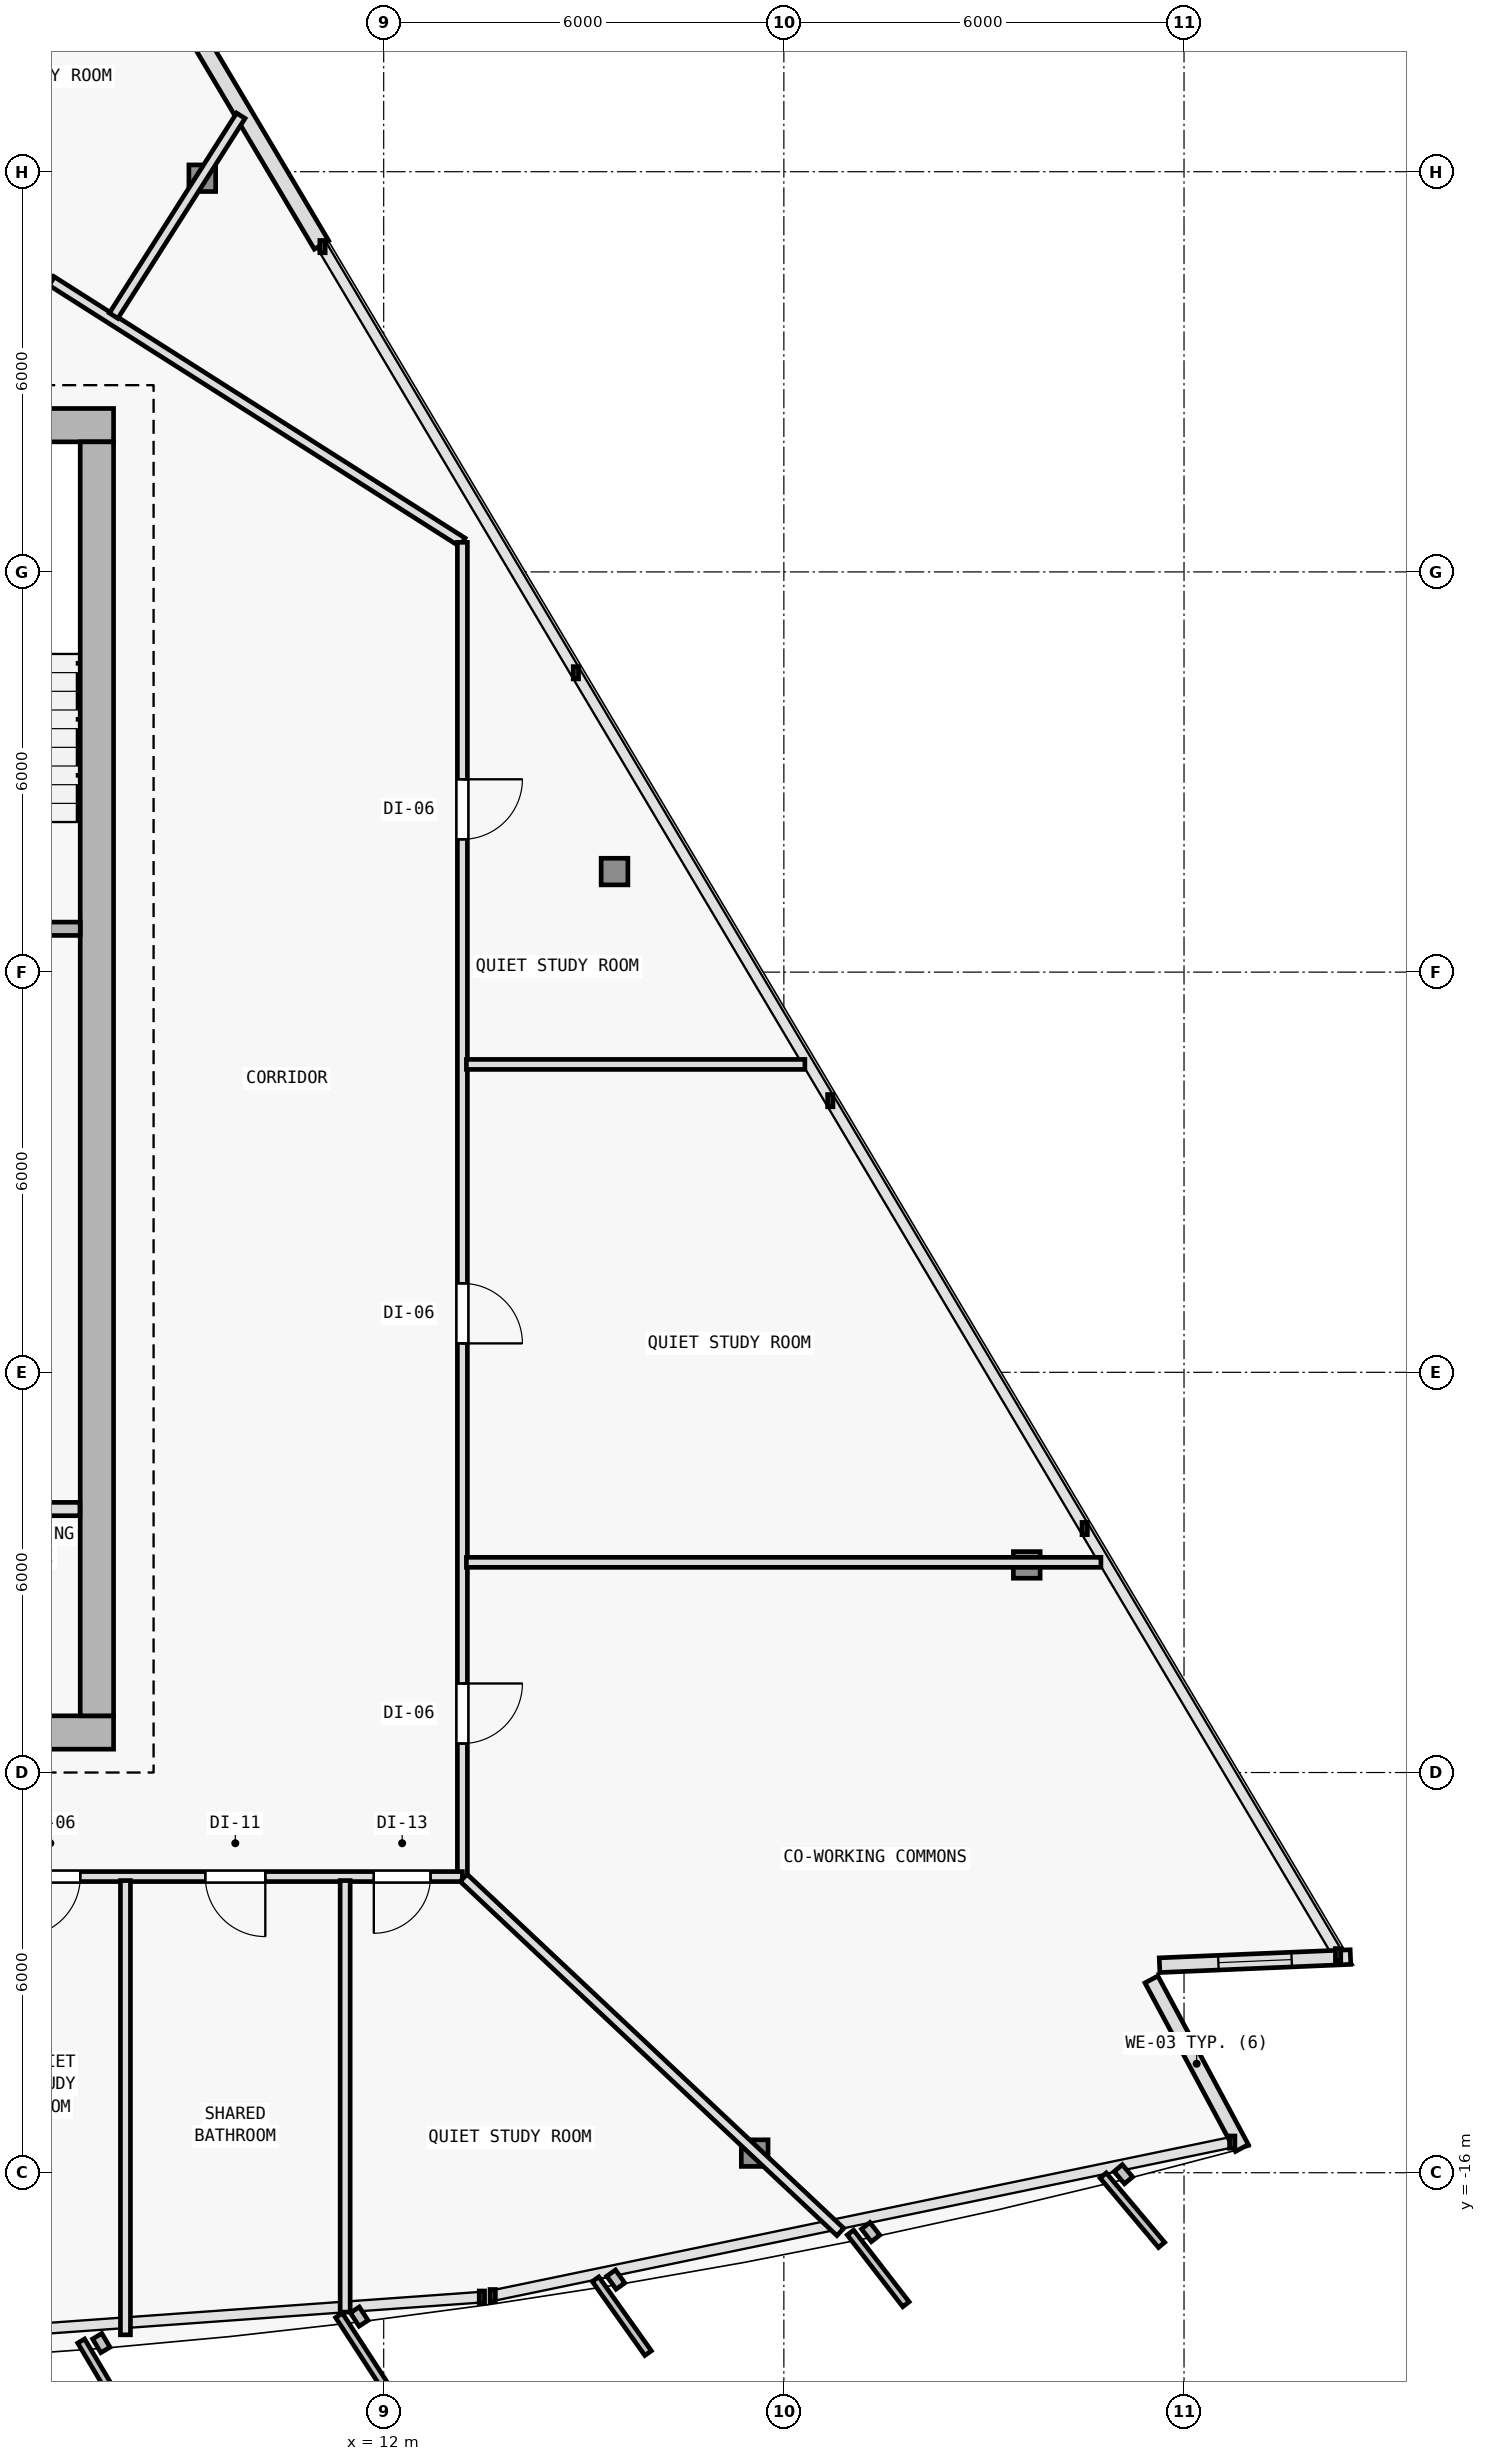
"""IFC4 building model, lengths in metres.
Left out: names, types, materials, properties, quantities, classifications, styles, units other than length and angle.
Written with IfcOpenShell. Run it as: python <this file> out.ifc"""

import sys

from ifc_helpers import new_model, si_unit, direction, frame, frame_2d, origin, origin_2d, place, context, subcontext, project, spatial, rectangle, i_section, extrude, element, fill, save


model = new_model("IFC4")
c1 = context("Model", 3, precision=1e-05, world=origin(), true_north=direction((0.0, 1.0)))
c2 = subcontext(c1, "Body", "Model", "MODEL_VIEW")
j1 = project(units=[si_unit("LENGTHUNIT", "METRE"), si_unit("PLANEANGLEUNIT", "RADIAN")], contexts=[c1])
p1 = place(None, origin())
s1 = spatial("IfcSite", under=j1, at=p1, CompositionType="ELEMENT")
p2 = place(p1, origin())
s2 = spatial("IfcBuilding", under=s1, at=p2, CompositionType="ELEMENT")
p3 = place(p2, frame((0.0, 0.0, 167.4)))
s3 = spatial("IfcBuildingStorey", under=s2, at=p3, CompositionType="ELEMENT", Elevation=167.4)
for number, where, z_axis, x_axis in (
    (1, (7.7, -9.4, 0.0), (0.0, 0.0, 1.0), (1.0, 0.0, 0.0)),
    (2, (7.7, 10.2, 0.0), (0.0, 0.0, 1.0), (1.0, 0.0, 0.0)),
    (3, (7.7, 0.4, 0.0), (0.0, 0.0, 1.0), (1.0, 0.0, 0.0)),
):
    element("IfcColumn", number, at=place(p3, frame(where, z_axis=z_axis, x_axis=x_axis)), inside=s3, PredefinedType="COLUMN", context=c2, shape_type="SweptSolid", body=[
        extrude(i_section(OverallWidth=0.404, OverallDepth=0.407, WebThickness=0.017, FlangeThickness=0.028, FilletRadius=0.015, at=origin_2d()), origin(), (0.0, 0.0, 1.0), 3.6),
    ])
p4 = place(p3, frame((17.562, -15.706, 0.006), z_axis=(-0.020596292833, 0.033511459955, 0.999226087917), x_axis=(-0.851954850327, -0.523615252838, 0.0)))
e4 = element("IfcColumn", 4, at=p4, inside=s3, PredefinedType="COLUMN", context=c2, shape_type="SweptSolid", body=[
    extrude(i_section(OverallWidth=0.401, OverallDepth=0.399, WebThickness=0.016, FlangeThickness=0.025, FilletRadius=0.015, at=origin_2d()), origin(), (0.0, 0.0, 1.0), 3.592),
])
p5 = place(p3, frame((21.642, -6.887, 0.006), z_axis=(-0.026107436898, 0.021620221181, 0.999425318758), x_axis=(-0.637813971185, -0.770190455771, 0.0)))
e5 = element("IfcColumn", 5, at=p5, inside=s3, PredefinedType="COLUMN", context=c2, shape_type="SweptSolid", body=[
    extrude(i_section(OverallWidth=0.401, OverallDepth=0.399, WebThickness=0.016, FlangeThickness=0.025, FilletRadius=0.015, at=origin_2d()), origin(), (0.0, 0.0, 1.0), 3.591),
])
p6 = place(p3, frame((15.461, 3.508, 0.006), z_axis=(-0.018907326549, 0.00952167524, 0.999775900241), x_axis=(-0.449781931574, -0.893138406984, 0.0)))
e6 = element("IfcColumn", 6, at=p6, inside=s3, PredefinedType="COLUMN", context=c2, shape_type="SweptSolid", body=[
    extrude(i_section(OverallWidth=0.401, OverallDepth=0.399, WebThickness=0.016, FlangeThickness=0.025, FilletRadius=0.015, at=origin_2d()), origin(), (0.0, 0.0, 1.0), 3.59),
])
p7 = place(p3, frame((9.28, 13.903, 0.006), z_axis=(-0.011699840322, -0.002584848443, 0.999928213571), x_axis=(0.215728093413, -0.976453475447, 0.0)))
e7 = element("IfcColumn", 7, at=p7, inside=s3, PredefinedType="COLUMN", context=c2, shape_type="SweptSolid", body=[
    extrude(i_section(OverallWidth=0.401, OverallDepth=0.399, WebThickness=0.016, FlangeThickness=0.025, FilletRadius=0.015, at=origin_2d()), origin(), (0.0, 0.0, 1.0), 3.589),
])
p8 = place(p3, frame((5.706, 21.919, 0.0), z_axis=(0.0, 0.0, 1.0), x_axis=(0.511079110892, -0.859533677298, 0.0)))
e8 = element("IfcWall", 8, at=p8, inside=s3, PredefinedType="SOLIDWALL", context=c2, shape_type="SweptSolid", body=[
    extrude(rectangle(XDim=10.489, YDim=0.25, at=frame_2d((5.245, 0.0))), origin(), (0.0, 0.0, 1.0), 3.35),
])
p9 = place(p8, frame((4.645, 0.0, 0.62)))
e9 = element("IfcOpeningElement", 9, at=p9, cuts=e8, PredefinedType="OPENING", context=c2, shape_type="SweptSolid", body=[
    extrude(rectangle(XDim=1.2, YDim=1.8, at=frame_2d((0.6, 0.9))), frame((0.0, 0.135, 0.0), z_axis=(0.0, -1.0, 0.0), x_axis=(1.0, 0.0, 0.0)), (0.0, 0.0, 1.0), 0.27),
])
p10 = place(p3, frame((23.511, -13.102, 0.0), z_axis=(0.0, 0.0, 1.0), x_axis=(0.472804807667, -0.881167188362, 0.0)))
e10 = element("IfcWall", 10, at=p10, inside=s3, PredefinedType="SOLIDWALL", context=c2, shape_type="SweptSolid", body=[
    extrude(rectangle(XDim=2.868, YDim=0.22, at=frame_2d((1.434, 0.0))), origin(), (0.0, 0.0, 1.0), 3.35),
])
p11 = place(p3, frame((26.496, -12.767, 0.0), z_axis=(0.0, 0.0, 1.0), x_axis=(-0.999095763679, -0.042516526188, 0.0)))
e11 = element("IfcWall", 11, at=p11, inside=s3, PredefinedType="SOLIDWALL", context=c2, shape_type="SweptSolid", body=[
    extrude(rectangle(XDim=2.865, YDim=0.22, at=frame_2d((1.433, 0.0))), origin(), (0.0, 0.0, 1.0), 3.35),
])
p12 = place(p11, frame((0.883, 0.0, 0.62)))
e12 = element("IfcOpeningElement", 12, at=p12, cuts=e11, PredefinedType="OPENING", context=c2, shape_type="SweptSolid", body=[
    extrude(rectangle(XDim=1.1, YDim=1.8, at=frame_2d((0.55, 0.9))), frame((0.0, 0.12, 0.0), z_axis=(0.0, -1.0, 0.0), x_axis=(1.0, 0.0, 0.0)), (0.0, 0.0, 1.0), 0.24),
])
p13 = place(p3, frame((-7.95, -9.4, 0.0), z_axis=(0.0, 0.0, 1.0), x_axis=(1.0, 0.0, 0.0)))
e13 = element("IfcWall", 13, at=p13, inside=s3, PredefinedType="SHEAR", context=c2, shape_type="SweptSolid", body=[
    extrude(rectangle(XDim=15.9, YDim=0.5, at=frame_2d((7.95, 0.0))), origin(), (0.0, 0.0, 1.0), 3.35),
])
p14 = place(p13, frame((9.6, 0.0, 0.0)))
e14 = element("IfcOpeningElement", 14, at=p14, cuts=e13, PredefinedType="OPENING", context=c2, shape_type="SweptSolid", body=[
    extrude(rectangle(XDim=1.5, YDim=2.2, at=frame_2d((0.75, 1.1))), frame((0.0, 0.26, 0.0), z_axis=(0.0, -1.0, 0.0), x_axis=(1.0, 0.0, 0.0)), (0.0, 0.0, 1.0), 0.52),
])
p15 = place(p3, frame((7.95, 10.2, 0.0), z_axis=(0.0, 0.0, 1.0), x_axis=(-1.0, 0.0, 0.0)))
e15 = element("IfcWall", 15, at=p15, inside=s3, PredefinedType="SHEAR", context=c2, shape_type="SweptSolid", body=[
    extrude(rectangle(XDim=15.9, YDim=0.5, at=frame_2d((7.95, 0.0))), origin(), (0.0, 0.0, 1.0), 3.35),
])
p16 = place(p15, frame((4.4, 0.0, 0.0)))
e16 = element("IfcOpeningElement", 16, at=p16, cuts=e15, PredefinedType="OPENING", context=c2, shape_type="SweptSolid", body=[
    extrude(rectangle(XDim=1.1, YDim=2.15, at=frame_2d((0.55, 1.075))), frame((0.0, 0.26, 0.0), z_axis=(0.0, -1.0, 0.0), x_axis=(1.0, 0.0, 0.0)), (0.0, 0.0, 1.0), 0.52),
])
p17 = place(p3, frame((7.7, 9.95, 0.0), z_axis=(0.0, 0.0, 1.0), x_axis=(0.0, -1.0, 0.0)))
e17 = element("IfcWall", 17, at=p17, inside=s3, PredefinedType="SHEAR", context=c2, shape_type="SweptSolid", body=[
    extrude(rectangle(XDim=19.1, YDim=0.5, at=frame_2d((9.55, 0.0))), origin(), (0.0, 0.0, 1.0), 3.35),
])
p18 = place(p3, frame((4.05, 2.65, 0.0), z_axis=(0.0, 0.0, 1.0), x_axis=(1.0, 0.0, 0.0)))
e18 = element("IfcWall", 18, at=p18, inside=s3, PredefinedType="SOLIDWALL", context=c2, shape_type="SweptSolid", body=[
    extrude(rectangle(XDim=3.4, YDim=0.2, at=frame_2d((1.7, 0.0))), origin(), (0.0, 0.0, 1.0), 3.35),
])
p19 = place(p3, frame((4.15, -6.05, 0.0), z_axis=(0.0, 0.0, 1.0), x_axis=(1.0, 0.0, 0.0)))
e19 = element("IfcWall", 19, at=p19, inside=s3, PredefinedType="SOLIDWALL", context=c2, shape_type="SweptSolid", body=[
    extrude(rectangle(XDim=3.295, YDim=0.2, at=frame_2d((1.647, 0.0))), origin(), (0.0, 0.0, 1.0), 3.35),
])
p20 = place(p3, frame((7.023, 12.36, 0.0), z_axis=(0.0, 0.0, 1.0), x_axis=(0.84376480085, -0.536713108511, 0.0)))
e20 = element("IfcWall", 20, at=p20, inside=s3, PredefinedType="PARTITIONING", context=c2, shape_type="SweptSolid", body=[
    extrude(rectangle(XDim=7.297, YDim=0.15, at=frame_2d((3.648, 0.0))), origin(), (0.0, 0.0, 1.0), 2.935),
])
p21 = place(p3, frame((13.18, 8.444, 0.0), z_axis=(0.0, 0.0, 1.0), x_axis=(0.0, -1.0, 0.0)))
e21 = element("IfcWall", 21, at=p21, inside=s3, PredefinedType="PARTITIONING", context=c2, shape_type="SweptSolid", body=[
    extrude(rectangle(XDim=20.004, YDim=0.15, at=frame_2d((10.002, 0.0))), origin(), (0.0, 0.0, 1.0), 2.825),
])
p22 = place(p21, frame((17.109, 0.0, 0.0)))
e22 = element("IfcOpeningElement", 22, at=p22, cuts=e21, PredefinedType="OPENING", context=c2, shape_type="SweptSolid", body=[
    extrude(rectangle(XDim=0.9, YDim=2.1, at=frame_2d((0.45, 1.05))), frame((0.0, 0.085, 0.0), z_axis=(0.0, -1.0, 0.0), x_axis=(1.0, 0.0, 0.0)), (0.0, 0.0, 1.0), 0.17),
])
p23 = place(p21, frame((11.11, 0.0, 0.0)))
e23 = element("IfcOpeningElement", 23, at=p23, cuts=e21, PredefinedType="OPENING", context=c2, shape_type="SweptSolid", body=[
    extrude(rectangle(XDim=0.9, YDim=2.1, at=frame_2d((0.45, 1.05))), frame((0.0, 0.085, 0.0), z_axis=(0.0, -1.0, 0.0), x_axis=(1.0, 0.0, 0.0)), (0.0, 0.0, 1.0), 0.17),
])
p24 = place(p21, frame((3.553, 0.0, 0.0)))
e24 = element("IfcOpeningElement", 24, at=p24, cuts=e21, PredefinedType="OPENING", context=c2, shape_type="SweptSolid", body=[
    extrude(rectangle(XDim=0.9, YDim=2.1, at=frame_2d((0.45, 1.05))), frame((0.0, 0.085, 0.0), z_axis=(0.0, -1.0, 0.0), x_axis=(1.0, 0.0, 0.0)), (0.0, 0.0, 1.0), 0.17),
])
p25 = place(p3, frame((13.18, -11.56, 0.0), z_axis=(0.0, 0.0, 1.0), x_axis=(-1.0, 0.0, 0.0)))
e25 = element("IfcWall", 25, at=p25, inside=s3, PredefinedType="PARTITIONING", context=c2, shape_type="SweptSolid", body=[
    extrude(rectangle(XDim=23.04, YDim=0.15, at=frame_2d((11.52, 0.0))), origin(), (0.0, 0.0, 1.0), 2.775),
])
p26 = place(p25, frame((20.508, 0.0, 0.0)))
e26 = element("IfcOpeningElement", 26, at=p26, cuts=e25, PredefinedType="OPENING", context=c2, shape_type="SweptSolid", body=[
    extrude(rectangle(XDim=0.9, YDim=2.1, at=frame_2d((0.45, 1.05))), frame((0.0, 0.085, 0.0), z_axis=(0.0, -1.0, 0.0), x_axis=(1.0, 0.0, 0.0)), (0.0, 0.0, 1.0), 0.17),
])
p27 = place(p25, frame((17.525, 0.0, 0.0)))
e27 = element("IfcOpeningElement", 27, at=p27, cuts=e25, PredefinedType="OPENING", context=c2, shape_type="SweptSolid", body=[
    extrude(rectangle(XDim=0.9, YDim=2.1, at=frame_2d((0.45, 1.05))), frame((0.0, 0.085, 0.0), z_axis=(0.0, -1.0, 0.0), x_axis=(1.0, 0.0, 0.0)), (0.0, 0.0, 1.0), 0.17),
])
p28 = place(p25, frame((14.848, 0.0, 0.0)))
e28 = element("IfcOpeningElement", 28, at=p28, cuts=e25, PredefinedType="OPENING", context=c2, shape_type="SweptSolid", body=[
    extrude(rectangle(XDim=0.9, YDim=2.1, at=frame_2d((0.45, 1.05))), frame((0.0, 0.085, 0.0), z_axis=(0.0, -1.0, 0.0), x_axis=(1.0, 0.0, 0.0)), (0.0, 0.0, 1.0), 0.17),
])
p29 = place(p25, frame((11.422, 0.0, 0.0)))
e29 = element("IfcOpeningElement", 29, at=p29, cuts=e25, PredefinedType="OPENING", context=c2, shape_type="SweptSolid", body=[
    extrude(rectangle(XDim=0.9, YDim=2.1, at=frame_2d((0.45, 1.05))), frame((0.0, 0.085, 0.0), z_axis=(0.0, -1.0, 0.0), x_axis=(1.0, 0.0, 0.0)), (0.0, 0.0, 1.0), 0.17),
])
p30 = place(p25, frame((8.225, 0.0, 0.0)))
e30 = element("IfcOpeningElement", 30, at=p30, cuts=e25, PredefinedType="OPENING", context=c2, shape_type="SweptSolid", body=[
    extrude(rectangle(XDim=0.9, YDim=2.1, at=frame_2d((0.45, 1.05))), frame((0.0, 0.085, 0.0), z_axis=(0.0, -1.0, 0.0), x_axis=(1.0, 0.0, 0.0)), (0.0, 0.0, 1.0), 0.17),
])
p31 = place(p25, frame((5.729, 0.0, 0.0)))
e31 = element("IfcOpeningElement", 31, at=p31, cuts=e25, PredefinedType="OPENING", context=c2, shape_type="SweptSolid", body=[
    extrude(rectangle(XDim=0.9, YDim=2.1, at=frame_2d((0.45, 1.05))), frame((0.0, 0.085, 0.0), z_axis=(0.0, -1.0, 0.0), x_axis=(1.0, 0.0, 0.0)), (0.0, 0.0, 1.0), 0.17),
])
p32 = place(p25, frame((2.955, 0.0, 0.0)))
e32 = element("IfcOpeningElement", 32, at=p32, cuts=e25, PredefinedType="OPENING", context=c2, shape_type="SweptSolid", body=[
    extrude(rectangle(XDim=0.9, YDim=2.1, at=frame_2d((0.45, 1.05))), frame((0.0, 0.085, 0.0), z_axis=(0.0, -1.0, 0.0), x_axis=(1.0, 0.0, 0.0)), (0.0, 0.0, 1.0), 0.17),
])
p33 = place(p25, frame((0.478, 0.0, 0.0)))
e33 = element("IfcOpeningElement", 33, at=p33, cuts=e25, PredefinedType="OPENING", context=c2, shape_type="SweptSolid", body=[
    extrude(rectangle(XDim=0.85, YDim=2.1, at=frame_2d((0.425, 1.05))), frame((0.0, 0.085, 0.0), z_axis=(0.0, -1.0, 0.0), x_axis=(1.0, 0.0, 0.0)), (0.0, 0.0, 1.0), 0.17),
])
p34 = place(p3, frame((13.199, -11.579, 0.0), z_axis=(0.0, 0.0, 1.0), x_axis=(0.728641814506, -0.684894959942, 0.0)))
e34 = element("IfcWall", 34, at=p34, inside=s3, PredefinedType="PARTITIONING", context=c2, shape_type="SweptSolid", body=[
    extrude(rectangle(XDim=7.752, YDim=0.15, at=frame_2d((3.876, 0.0))), origin(), (0.0, 0.0, 1.0), 2.775),
])
p35 = place(p3, frame((13.24, -6.849, 0.0), z_axis=(0.0, 0.0, 1.0), x_axis=(1.0, 0.0, 0.0)))
e35 = element("IfcWall", 35, at=p35, inside=s3, PredefinedType="PARTITIONING", context=c2, shape_type="SweptSolid", body=[
    extrude(rectangle(XDim=9.514, YDim=0.15, at=frame_2d((4.757, 0.0))), origin(), (0.0, 0.0, 1.0), 2.825),
])
p36 = place(p3, frame((7.951, 11.841, 0.0), z_axis=(0.0, 0.0, 1.0), x_axis=(0.536702086474, 0.843771811792, 0.0)))
e36 = element("IfcWall", 36, at=p36, inside=s3, PredefinedType="PARTITIONING", context=c2, shape_type="SweptSolid", body=[
    extrude(rectangle(XDim=3.553, YDim=0.15, at=frame_2d((1.777, 0.0))), origin(), (0.0, 0.0, 1.0), 2.935),
])
p37 = place(p3, frame((11.422, -11.62, 0.0), z_axis=(0.0, 0.0, 1.0), x_axis=(0.0, -1.0, 0.0)))
e37 = element("IfcWall", 37, at=p37, inside=s3, PredefinedType="PARTITIONING", context=c2, shape_type="SweptSolid", body=[
    extrude(rectangle(XDim=6.47, YDim=0.15, at=frame_2d((3.235, 0.0))), origin(), (0.0, 0.0, 1.0), 2.825),
])
p38 = place(p3, frame((8.128, -11.62, 0.0), z_axis=(0.0, 0.0, 1.0), x_axis=(0.0, -1.0, 0.0)))
e38 = element("IfcWall", 38, at=p38, inside=s3, PredefinedType="PARTITIONING", context=c2, shape_type="SweptSolid", body=[
    extrude(rectangle(XDim=6.81, YDim=0.15, at=frame_2d((3.405, 0.0))), origin(), (0.0, 0.0, 1.0), 2.875),
])
p39 = place(p3, frame((13.24, 0.616, 0.0), z_axis=(0.0, 0.0, 1.0), x_axis=(1.0, 0.0, 0.0)))
e39 = element("IfcWall", 39, at=p39, inside=s3, PredefinedType="PARTITIONING", context=c2, shape_type="SweptSolid", body=[
    extrude(rectangle(XDim=5.075, YDim=0.15, at=frame_2d((2.538, 0.0))), origin(), (0.0, 0.0, 1.0), 2.935),
])
p40 = place(p12, origin())
e40 = element("IfcWindow", 40, at=p40, inside=s3, PartitioningType="SINGLE_PANEL", PredefinedType="WINDOW", context=c2, shape_type="SweptSolid", body=[
    extrude(rectangle(XDim=1.1, YDim=1.8, at=frame_2d((0.55, 0.9))), frame((0.0, 0.03, 0.0), z_axis=(0.0, -1.0, 0.0), x_axis=(1.0, 0.0, 0.0)), (0.0, 0.0, 1.0), 0.06),
])
fill(e12, e40)
p41 = place(p31, origin())
e41 = element("IfcDoor", 41, at=p41, inside=s3, OperationType="SINGLE_SWING_RIGHT", PredefinedType="DOOR", context=c2, shape_type="SweptSolid", body=[
    extrude(rectangle(XDim=0.9, YDim=2.1, at=frame_2d((0.45, 1.05))), frame((0.0, 0.025, 0.0), z_axis=(0.0, -1.0, 0.0), x_axis=(1.0, 0.0, 0.0)), (0.0, 0.0, 1.0), 0.05),
])
fill(e31, e41)
p42 = place(p32, origin())
e42 = element("IfcDoor", 42, at=p42, inside=s3, OperationType="SINGLE_SWING_LEFT", PredefinedType="DOOR", context=c2, shape_type="SweptSolid", body=[
    extrude(rectangle(XDim=0.9, YDim=2.1, at=frame_2d((0.45, 1.05))), frame((0.0, 0.025, 0.0), z_axis=(0.0, -1.0, 0.0), x_axis=(1.0, 0.0, 0.0)), (0.0, 0.0, 1.0), 0.05),
])
fill(e32, e42)
p43 = place(p33, origin())
e43 = element("IfcDoor", 43, at=p43, inside=s3, OperationType="SINGLE_SWING_RIGHT", PredefinedType="DOOR", context=c2, shape_type="SweptSolid", body=[
    extrude(rectangle(XDim=0.85, YDim=2.1, at=frame_2d((0.425, 1.05))), frame((0.0, 0.025, 0.0), z_axis=(0.0, -1.0, 0.0), x_axis=(1.0, 0.0, 0.0)), (0.0, 0.0, 1.0), 0.05),
])
fill(e33, e43)
p44 = place(p22, origin())
e44 = element("IfcDoor", 44, at=p44, inside=s3, OperationType="SINGLE_SWING_LEFT", PredefinedType="DOOR", context=c2, shape_type="SweptSolid", body=[
    extrude(rectangle(XDim=0.9, YDim=2.1, at=frame_2d((0.45, 1.05))), frame((0.0, 0.025, 0.0), z_axis=(0.0, -1.0, 0.0), x_axis=(1.0, 0.0, 0.0)), (0.0, 0.0, 1.0), 0.05),
])
fill(e22, e44)
p45 = place(p23, origin())
e45 = element("IfcDoor", 45, at=p45, inside=s3, OperationType="SINGLE_SWING_RIGHT", PredefinedType="DOOR", context=c2, shape_type="SweptSolid", body=[
    extrude(rectangle(XDim=0.9, YDim=2.1, at=frame_2d((0.45, 1.05))), frame((0.0, 0.025, 0.0), z_axis=(0.0, -1.0, 0.0), x_axis=(1.0, 0.0, 0.0)), (0.0, 0.0, 1.0), 0.05),
])
fill(e23, e45)
p46 = place(p24, origin())
e46 = element("IfcDoor", 46, at=p46, inside=s3, OperationType="SINGLE_SWING_LEFT", PredefinedType="DOOR", context=c2, shape_type="SweptSolid", body=[
    extrude(rectangle(XDim=0.9, YDim=2.1, at=frame_2d((0.45, 1.05))), frame((0.0, 0.025, 0.0), z_axis=(0.0, -1.0, 0.0), x_axis=(1.0, 0.0, 0.0)), (0.0, 0.0, 1.0), 0.05),
])
fill(e24, e46)
save(model, sys.argv[1])
